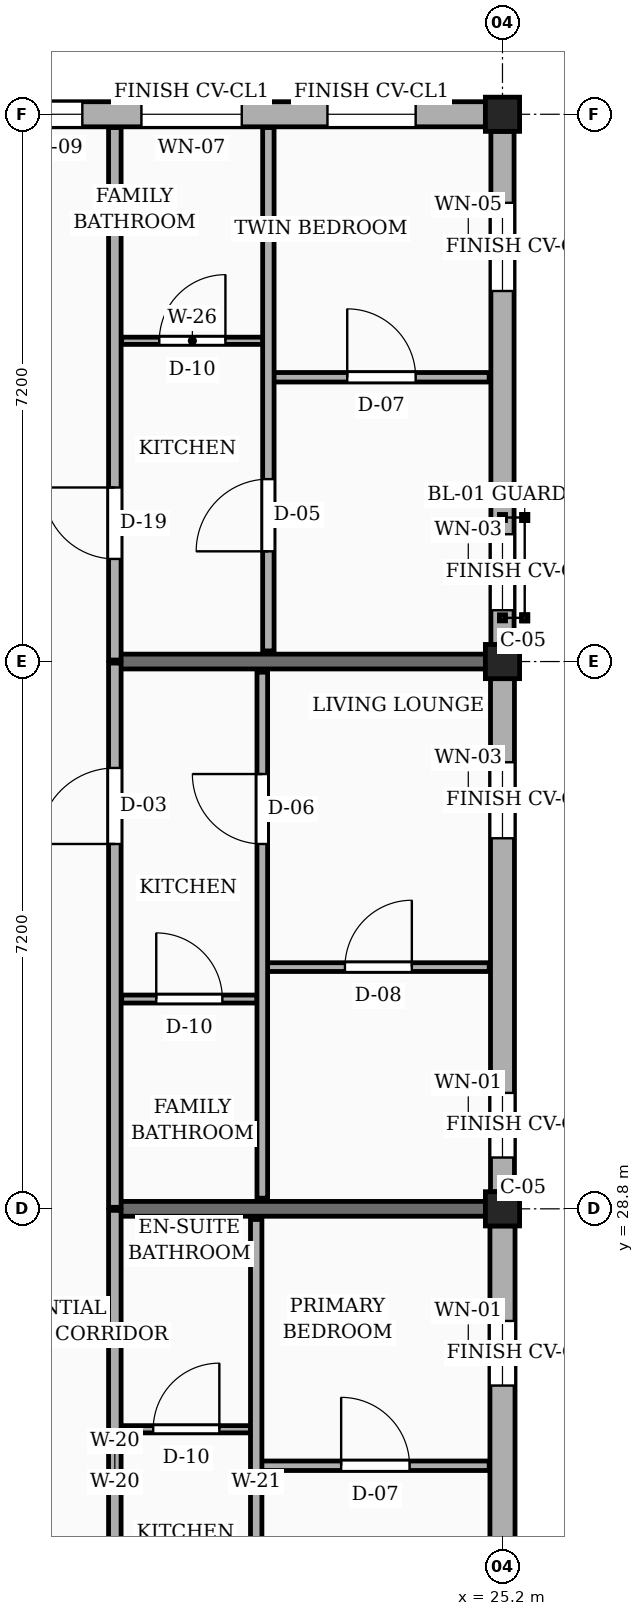
"""IFC4 building model, lengths in metres.
Left out: names, types, materials, properties, quantities, classifications, styles, units other than length and angle.
Written with IfcOpenShell. Run it as: python <this file> out.ifc"""

import sys

from ifc_helpers import new_model, si_unit, direction, frame, frame_2d, origin, origin_2d, place, context, subcontext, project, spatial, rectangle, extrude, element, fill, save


model = new_model("IFC4")
c1 = context("Model", 3, precision=1e-05, world=origin(), true_north=direction((0.0, 1.0)))
c2 = subcontext(c1, "Body", "Model", "MODEL_VIEW")
j1 = project(units=[si_unit("LENGTHUNIT", "METRE"), si_unit("PLANEANGLEUNIT", "RADIAN")], contexts=[c1])
p1 = place(None, origin())
s1 = spatial("IfcSite", under=j1, at=p1, CompositionType="ELEMENT")
p2 = place(p1, origin())
s2 = spatial("IfcBuilding", under=s1, at=p2, CompositionType="ELEMENT")
p3 = place(p2, frame((0.0, 0.0, 39.15)))
s3 = spatial("IfcBuildingStorey", under=s2, at=p3, CompositionType="ELEMENT", Elevation=39.15)
for number, where, z_axis, x_axis in (
    (1, (25.2, 28.8, 0.0), (0.0, 0.0, 1.0), (1.0, 0.0, 0.0)),
    (2, (25.2, 36.0, 0.0), (0.0, 0.0, 1.0), (1.0, 0.0, 0.0)),
    (3, (25.2, 43.2, 0.0), (0.0, 0.0, 1.0), (1.0, 0.0, 0.0)),
):
    element("IfcColumn", number, at=place(p3, frame(where, z_axis=z_axis, x_axis=x_axis)), inside=s3, PredefinedType="COLUMN", context=c2, shape_type="SweptSolid", body=[
        extrude(rectangle(XDim=0.45, YDim=0.45, at=origin_2d()), origin(), (0.0, 0.0, 1.0), 3.15),
    ])
for number, where, z_axis, x_axis in (
    (4, (20.1, 28.8, 0.0), (0.0, 0.0, 1.0), (1.0, 0.0, 0.0)),
    (5, (20.1, 36.0, 0.0), (0.0, 0.0, 1.0), (1.0, 0.0, 0.0)),
):
    element("IfcWall", number, at=place(p3, frame(where, z_axis=z_axis, x_axis=x_axis)), inside=s3, PredefinedType="SOLIDWALL", context=c2, shape_type="SweptSolid", body=[
        extrude(rectangle(XDim=4.875, YDim=0.195, at=frame_2d((2.438, 0.0))), origin(), (0.0, 0.0, 1.0), 2.17),
    ])
p4 = place(p3, frame((25.2, 21.825, 0.0), z_axis=(0.0, 0.0, 1.0), x_axis=(0.0, 1.0, 0.0)))
e6 = element("IfcWall", 6, at=p4, inside=s3, PredefinedType="SOLIDWALL", context=c2, shape_type="SweptSolid", body=[
    extrude(rectangle(XDim=6.75, YDim=0.33, at=frame_2d((3.375, 0.0))), origin(), (0.0, 0.0, 1.0), 2.44),
])
p5 = place(p4, frame((0.45, 0.0, 0.78)))
e7 = element("IfcOpeningElement", 7, at=p5, cuts=e6, PredefinedType="OPENING", context=c2, shape_type="SweptSolid", body=[
    extrude(rectangle(XDim=1.35, YDim=1.44, at=frame_2d((0.675, 0.72))), frame((0.0, 0.175, 0.0), z_axis=(0.0, -1.0, 0.0), x_axis=(1.0, 0.0, 0.0)), (0.0, 0.0, 1.0), 0.35),
])
p6 = place(p4, frame((4.65, 0.0, 0.78)))
e8 = element("IfcOpeningElement", 8, at=p6, cuts=e6, PredefinedType="OPENING", context=c2, shape_type="SweptSolid", body=[
    extrude(rectangle(XDim=0.85, YDim=1.15, at=frame_2d((0.425, 0.575))), frame((0.0, 0.175, 0.0), z_axis=(0.0, -1.0, 0.0), x_axis=(1.0, 0.0, 0.0)), (0.0, 0.0, 1.0), 0.35),
])
p7 = place(p3, frame((25.2, 29.025, 0.0), z_axis=(0.0, 0.0, 1.0), x_axis=(0.0, 1.0, 0.0)))
e9 = element("IfcWall", 9, at=p7, inside=s3, PredefinedType="SOLIDWALL", context=c2, shape_type="SweptSolid", body=[
    extrude(rectangle(XDim=6.75, YDim=0.315, at=frame_2d((3.375, 0.0))), origin(), (0.0, 0.0, 1.0), 2.44),
])
p8 = place(p7, frame((0.45, 0.0, 0.78)))
e10 = element("IfcOpeningElement", 10, at=p8, cuts=e9, PredefinedType="OPENING", context=c2, shape_type="SweptSolid", body=[
    extrude(rectangle(XDim=0.85, YDim=1.15, at=frame_2d((0.425, 0.575))), frame((0.0, 0.167, 0.0), z_axis=(0.0, -1.0, 0.0), x_axis=(1.0, 0.0, 0.0)), (0.0, 0.0, 1.0), 0.335),
])
p9 = place(p7, frame((4.65, 0.0, 0.78)))
e11 = element("IfcOpeningElement", 11, at=p9, cuts=e9, PredefinedType="OPENING", context=c2, shape_type="SweptSolid", body=[
    extrude(rectangle(XDim=1.0, YDim=1.15, at=frame_2d((0.5, 0.575))), frame((0.0, 0.167, 0.0), z_axis=(0.0, -1.0, 0.0), x_axis=(1.0, 0.0, 0.0)), (0.0, 0.0, 1.0), 0.335),
])
p10 = place(p3, frame((25.2, 36.225, 0.0), z_axis=(0.0, 0.0, 1.0), x_axis=(0.0, 1.0, 0.0)))
e12 = element("IfcWall", 12, at=p10, inside=s3, PredefinedType="SOLIDWALL", context=c2, shape_type="SweptSolid", body=[
    extrude(rectangle(XDim=6.75, YDim=0.305, at=frame_2d((3.375, 0.0))), origin(), (0.0, 0.0, 1.0), 2.44),
])
p11 = place(p10, frame((0.45, 0.0, 0.78)))
e13 = element("IfcOpeningElement", 13, at=p11, cuts=e12, PredefinedType="OPENING", context=c2, shape_type="SweptSolid", body=[
    extrude(rectangle(XDim=1.0, YDim=1.15, at=frame_2d((0.5, 0.575))), frame((0.0, 0.163, 0.0), z_axis=(0.0, -1.0, 0.0), x_axis=(1.0, 0.0, 0.0)), (0.0, 0.0, 1.0), 0.325),
])
p12 = place(p10, frame((4.65, 0.0, 0.78)))
e14 = element("IfcOpeningElement", 14, at=p12, cuts=e12, PredefinedType="OPENING", context=c2, shape_type="SweptSolid", body=[
    extrude(rectangle(XDim=1.16, YDim=1.15, at=frame_2d((0.58, 0.575))), frame((0.0, 0.163, 0.0), z_axis=(0.0, -1.0, 0.0), x_axis=(1.0, 0.0, 0.0)), (0.0, 0.0, 1.0), 0.325),
])
p13 = place(p3, frame((24.975, 43.2, 0.0), z_axis=(0.0, 0.0, 1.0), x_axis=(-1.0, 0.0, 0.0)))
e15 = element("IfcWall", 15, at=p13, inside=s3, PredefinedType="SOLIDWALL", context=c2, shape_type="SweptSolid", body=[
    extrude(rectangle(XDim=6.75, YDim=0.33, at=frame_2d((3.375, 0.0))), origin(), (0.0, 0.0, 1.0), 2.44),
])
p14 = place(p13, frame((0.917, 0.0, 0.78)))
e16 = element("IfcOpeningElement", 16, at=p14, cuts=e15, PredefinedType="OPENING", context=c2, shape_type="SweptSolid", body=[
    extrude(rectangle(XDim=1.16, YDim=1.15, at=frame_2d((0.58, 0.575))), frame((0.0, 0.175, 0.0), z_axis=(0.0, -1.0, 0.0), x_axis=(1.0, 0.0, 0.0)), (0.0, 0.0, 1.0), 0.35),
])
p15 = place(p13, frame((3.205, 0.0, 0.78)))
e17 = element("IfcOpeningElement", 17, at=p15, cuts=e15, PredefinedType="OPENING", context=c2, shape_type="SweptSolid", body=[
    extrude(rectangle(XDim=1.32, YDim=1.15, at=frame_2d((0.66, 0.575))), frame((0.0, 0.175, 0.0), z_axis=(0.0, -1.0, 0.0), x_axis=(1.0, 0.0, 0.0)), (0.0, 0.0, 1.0), 0.35),
])
p16 = place(p13, frame((5.302, 0.0, 0.78)))
e18 = element("IfcOpeningElement", 18, at=p16, cuts=e15, PredefinedType="OPENING", context=c2, shape_type="SweptSolid", body=[
    extrude(rectangle(XDim=0.88, YDim=1.26, at=frame_2d((0.44, 0.63))), frame((0.0, 0.175, 0.0), z_axis=(0.0, -1.0, 0.0), x_axis=(1.0, 0.0, 0.0)), (0.0, 0.0, 1.0), 0.35),
])
p17 = place(p3, frame((20.1, 21.62, 0.0), z_axis=(0.0, 0.0, 1.0), x_axis=(0.0, 1.0, 0.0)))
e19 = element("IfcWall", 19, at=p17, inside=s3, PredefinedType="PARTITIONING", context=c2, shape_type="SweptSolid", body=[
    extrude(rectangle(XDim=7.16, YDim=0.165, at=frame_2d((3.58, 0.0))), origin(), (0.0, 0.0, 1.0), 2.305),
])
p18 = place(p17, frame((1.33, 0.0, 0.0)))
e20 = element("IfcOpeningElement", 20, at=p18, cuts=e19, PredefinedType="OPENING", context=c2, shape_type="SweptSolid", body=[
    extrude(rectangle(XDim=1.14, YDim=2.18, at=frame_2d((0.57, 1.09))), frame((0.0, 0.093, 0.0), z_axis=(0.0, -1.0, 0.0), x_axis=(1.0, 0.0, 0.0)), (0.0, 0.0, 1.0), 0.185),
])
p19 = place(p3, frame((20.1, 28.82, 0.0), z_axis=(0.0, 0.0, 1.0), x_axis=(0.0, 1.0, 0.0)))
e21 = element("IfcWall", 21, at=p19, inside=s3, PredefinedType="PARTITIONING", context=c2, shape_type="SweptSolid", body=[
    extrude(rectangle(XDim=7.16, YDim=0.165, at=frame_2d((3.58, 0.0))), origin(), (0.0, 0.0, 1.0), 2.305),
])
p20 = place(p19, frame((4.78, 0.0, 0.0)))
e22 = element("IfcOpeningElement", 22, at=p20, cuts=e21, PredefinedType="OPENING", context=c2, shape_type="SweptSolid", body=[
    extrude(rectangle(XDim=1.0, YDim=2.15, at=frame_2d((0.5, 1.075))), frame((0.0, 0.093, 0.0), z_axis=(0.0, -1.0, 0.0), x_axis=(1.0, 0.0, 0.0)), (0.0, 0.0, 1.0), 0.185),
])
p21 = place(p3, frame((20.1, 36.02, 0.0), z_axis=(0.0, 0.0, 1.0), x_axis=(0.0, 1.0, 0.0)))
e23 = element("IfcWall", 23, at=p21, inside=s3, PredefinedType="PARTITIONING", context=c2, shape_type="SweptSolid", body=[
    extrude(rectangle(XDim=7.005, YDim=0.165, at=frame_2d((3.502, 0.0))), origin(), (0.0, 0.0, 1.0), 2.305),
])
p22 = place(p21, frame((1.33, 0.0, 0.0)))
e24 = element("IfcOpeningElement", 24, at=p22, cuts=e23, PredefinedType="OPENING", context=c2, shape_type="SweptSolid", body=[
    extrude(rectangle(XDim=0.94, YDim=2.12, at=frame_2d((0.47, 1.06))), frame((0.0, 0.093, 0.0), z_axis=(0.0, -1.0, 0.0), x_axis=(1.0, 0.0, 0.0)), (0.0, 0.0, 1.0), 0.185),
])
p23 = place(p3, frame((22.03, 25.42, 0.0), z_axis=(0.0, 0.0, 1.0), x_axis=(1.0, 0.0, 0.0)))
e25 = element("IfcWall", 25, at=p23, inside=s3, PredefinedType="PARTITIONING", context=c2, shape_type="SweptSolid", body=[
    extrude(rectangle(XDim=2.995, YDim=0.125, at=frame_2d((1.498, 0.0))), origin(), (0.0, 0.0, 1.0), 2.305),
])
p24 = place(p23, frame((1.048, 0.0, 0.0)))
e26 = element("IfcOpeningElement", 26, at=p24, cuts=e25, PredefinedType="OPENING", context=c2, shape_type="SweptSolid", body=[
    extrude(rectangle(XDim=0.9, YDim=2.1, at=frame_2d((0.45, 1.05))), frame((0.0, 0.073, 0.0), z_axis=(0.0, -1.0, 0.0), x_axis=(1.0, 0.0, 0.0)), (0.0, 0.0, 1.0), 0.145),
])
p25 = place(p3, frame((20.19, 25.9, 0.0), z_axis=(0.0, 0.0, 1.0), x_axis=(1.0, 0.0, 0.0)))
e27 = element("IfcWall", 27, at=p25, inside=s3, PredefinedType="PARTITIONING", context=c2, shape_type="SweptSolid", body=[
    extrude(rectangle(XDim=1.7, YDim=0.095, at=frame_2d((0.85, 0.0))), origin(), (0.0, 0.0, 1.0), 2.305),
])
p26 = place(p25, frame((0.415, 0.0, 0.0)))
e28 = element("IfcOpeningElement", 28, at=p26, cuts=e27, PredefinedType="OPENING", context=c2, shape_type="SweptSolid", body=[
    extrude(rectangle(XDim=0.87, YDim=2.05, at=frame_2d((0.435, 1.025))), frame((0.0, 0.058, 0.0), z_axis=(0.0, -1.0, 0.0), x_axis=(1.0, 0.0, 0.0)), (0.0, 0.0, 1.0), 0.115),
])
p27 = place(p3, frame((21.96, 21.74, 0.0), z_axis=(0.0, 0.0, 1.0), x_axis=(0.0, 1.0, 0.0)))
e29 = element("IfcWall", 29, at=p27, inside=s3, PredefinedType="PARTITIONING", context=c2, shape_type="SweptSolid", body=[
    extrude(rectangle(XDim=6.92, YDim=0.15, at=frame_2d((3.46, 0.0))), origin(), (0.0, 0.0, 1.0), 2.305),
])
p28 = place(p27, frame((1.31, 0.0, 0.0)))
e30 = element("IfcOpeningElement", 30, at=p28, cuts=e29, PredefinedType="OPENING", context=c2, shape_type="SweptSolid", body=[
    extrude(rectangle(XDim=0.95, YDim=2.1, at=frame_2d((0.475, 1.05))), frame((0.0, 0.085, 0.0), z_axis=(0.0, -1.0, 0.0), x_axis=(1.0, 0.0, 0.0)), (0.0, 0.0, 1.0), 0.17),
])
p29 = place(p3, frame((22.11, 31.98, 0.0), z_axis=(0.0, 0.0, 1.0), x_axis=(1.0, 0.0, 0.0)))
e31 = element("IfcWall", 31, at=p29, inside=s3, PredefinedType="PARTITIONING", context=c2, shape_type="SweptSolid", body=[
    extrude(rectangle(XDim=2.915, YDim=0.115, at=frame_2d((1.458, 0.0))), origin(), (0.0, 0.0, 1.0), 2.305),
])
p30 = place(p29, frame((1.018, 0.0, 0.0)))
e32 = element("IfcOpeningElement", 32, at=p30, cuts=e31, PredefinedType="OPENING", context=c2, shape_type="SweptSolid", body=[
    extrude(rectangle(XDim=0.88, YDim=2.08, at=frame_2d((0.44, 1.04))), frame((0.0, 0.067, 0.0), z_axis=(0.0, -1.0, 0.0), x_axis=(1.0, 0.0, 0.0)), (0.0, 0.0, 1.0), 0.135),
])
p31 = place(p3, frame((20.19, 31.56, 0.0), z_axis=(0.0, 0.0, 1.0), x_axis=(1.0, 0.0, 0.0)))
e33 = element("IfcWall", 33, at=p31, inside=s3, PredefinedType="PARTITIONING", context=c2, shape_type="SweptSolid", body=[
    extrude(rectangle(XDim=1.78, YDim=0.105, at=frame_2d((0.89, 0.0))), origin(), (0.0, 0.0, 1.0), 2.305),
])
p32 = place(p31, frame((0.455, 0.0, 0.0)))
e34 = element("IfcOpeningElement", 34, at=p32, cuts=e33, PredefinedType="OPENING", context=c2, shape_type="SweptSolid", body=[
    extrude(rectangle(XDim=0.87, YDim=2.05, at=frame_2d((0.435, 1.025))), frame((0.0, 0.062, 0.0), z_axis=(0.0, -1.0, 0.0), x_axis=(1.0, 0.0, 0.0)), (0.0, 0.0, 1.0), 0.125),
])
p33 = place(p3, frame((22.04, 28.94, 0.0), z_axis=(0.0, 0.0, 1.0), x_axis=(0.0, 1.0, 0.0)))
e35 = element("IfcWall", 35, at=p33, inside=s3, PredefinedType="PARTITIONING", context=c2, shape_type="SweptSolid", body=[
    extrude(rectangle(XDim=6.92, YDim=0.14, at=frame_2d((3.46, 0.0))), origin(), (0.0, 0.0, 1.0), 2.305),
])
p34 = place(p33, frame((4.66, 0.0, 0.0)))
e36 = element("IfcOpeningElement", 36, at=p34, cuts=e35, PredefinedType="OPENING", context=c2, shape_type="SweptSolid", body=[
    extrude(rectangle(XDim=0.92, YDim=2.1, at=frame_2d((0.46, 1.05))), frame((0.0, 0.08, 0.0), z_axis=(0.0, -1.0, 0.0), x_axis=(1.0, 0.0, 0.0)), (0.0, 0.0, 1.0), 0.16),
])
p35 = place(p3, frame((22.19, 39.74, 0.0), z_axis=(0.0, 0.0, 1.0), x_axis=(1.0, 0.0, 0.0)))
e37 = element("IfcWall", 37, at=p35, inside=s3, PredefinedType="PARTITIONING", context=c2, shape_type="SweptSolid", body=[
    extrude(rectangle(XDim=2.835, YDim=0.125, at=frame_2d((1.417, 0.0))), origin(), (0.0, 0.0, 1.0), 2.305),
])
p36 = place(p35, frame((0.968, 0.0, 0.0)))
e38 = element("IfcOpeningElement", 38, at=p36, cuts=e37, PredefinedType="OPENING", context=c2, shape_type="SweptSolid", body=[
    extrude(rectangle(XDim=0.9, YDim=2.1, at=frame_2d((0.45, 1.05))), frame((0.0, 0.073, 0.0), z_axis=(0.0, -1.0, 0.0), x_axis=(1.0, 0.0, 0.0)), (0.0, 0.0, 1.0), 0.145),
])
p37 = place(p3, frame((20.19, 40.22, 0.0), z_axis=(0.0, 0.0, 1.0), x_axis=(1.0, 0.0, 0.0)))
e39 = element("IfcWall", 39, at=p37, inside=s3, PredefinedType="PARTITIONING", context=c2, shape_type="SweptSolid", body=[
    extrude(rectangle(XDim=1.86, YDim=0.095, at=frame_2d((0.93, 0.0))), origin(), (0.0, 0.0, 1.0), 2.305),
])
p38 = place(p37, frame((0.495, 0.0, 0.0)))
e40 = element("IfcOpeningElement", 40, at=p38, cuts=e39, PredefinedType="OPENING", context=c2, shape_type="SweptSolid", body=[
    extrude(rectangle(XDim=0.87, YDim=2.05, at=frame_2d((0.435, 1.025))), frame((0.0, 0.058, 0.0), z_axis=(0.0, -1.0, 0.0), x_axis=(1.0, 0.0, 0.0)), (0.0, 0.0, 1.0), 0.115),
])
p39 = place(p3, frame((22.12, 36.14, 0.0), z_axis=(0.0, 0.0, 1.0), x_axis=(0.0, 1.0, 0.0)))
e41 = element("IfcWall", 41, at=p39, inside=s3, PredefinedType="PARTITIONING", context=c2, shape_type="SweptSolid", body=[
    extrude(rectangle(XDim=6.885, YDim=0.15, at=frame_2d((3.442, 0.0))), origin(), (0.0, 0.0, 1.0), 2.305),
])
p40 = place(p39, frame((1.31, 0.0, 0.0)))
e42 = element("IfcOpeningElement", 42, at=p40, cuts=e41, PredefinedType="OPENING", context=c2, shape_type="SweptSolid", body=[
    extrude(rectangle(XDim=0.95, YDim=2.1, at=frame_2d((0.475, 1.05))), frame((0.0, 0.085, 0.0), z_axis=(0.0, -1.0, 0.0), x_axis=(1.0, 0.0, 0.0)), (0.0, 0.0, 1.0), 0.17),
])
p41 = place(p6, origin())
e43 = element("IfcWindow", 43, at=p41, inside=s3, PartitioningType="SINGLE_PANEL", PredefinedType="WINDOW", context=c2, shape_type="SweptSolid", body=[
    extrude(rectangle(XDim=0.85, YDim=1.15, at=frame_2d((0.425, 0.575))), frame((0.0, 0.03, 0.0), z_axis=(0.0, -1.0, 0.0), x_axis=(1.0, 0.0, 0.0)), (0.0, 0.0, 1.0), 0.06),
])
fill(e8, e43)
p42 = place(p8, origin())
e44 = element("IfcWindow", 44, at=p42, inside=s3, PartitioningType="SINGLE_PANEL", PredefinedType="WINDOW", context=c2, shape_type="SweptSolid", body=[
    extrude(rectangle(XDim=0.85, YDim=1.15, at=frame_2d((0.425, 0.575))), frame((0.0, 0.03, 0.0), z_axis=(0.0, -1.0, 0.0), x_axis=(1.0, 0.0, 0.0)), (0.0, 0.0, 1.0), 0.06),
])
fill(e10, e44)
p43 = place(p9, origin())
e45 = element("IfcWindow", 45, at=p43, inside=s3, PartitioningType="SINGLE_PANEL", PredefinedType="WINDOW", context=c2, shape_type="SweptSolid", body=[
    extrude(rectangle(XDim=1.0, YDim=1.15, at=frame_2d((0.5, 0.575))), frame((0.0, 0.03, 0.0), z_axis=(0.0, -1.0, 0.0), x_axis=(1.0, 0.0, 0.0)), (0.0, 0.0, 1.0), 0.06),
])
fill(e11, e45)
p44 = place(p11, origin())
e46 = element("IfcWindow", 46, at=p44, inside=s3, PartitioningType="SINGLE_PANEL", PredefinedType="WINDOW", context=c2, shape_type="SweptSolid", body=[
    extrude(rectangle(XDim=1.0, YDim=1.15, at=frame_2d((0.5, 0.575))), frame((0.0, 0.03, 0.0), z_axis=(0.0, -1.0, 0.0), x_axis=(1.0, 0.0, 0.0)), (0.0, 0.0, 1.0), 0.06),
])
fill(e13, e46)
p45 = place(p12, origin())
e47 = element("IfcWindow", 47, at=p45, inside=s3, PartitioningType="SINGLE_PANEL", PredefinedType="WINDOW", context=c2, shape_type="SweptSolid", body=[
    extrude(rectangle(XDim=1.16, YDim=1.15, at=frame_2d((0.58, 0.575))), frame((0.0, 0.03, 0.0), z_axis=(0.0, -1.0, 0.0), x_axis=(1.0, 0.0, 0.0)), (0.0, 0.0, 1.0), 0.06),
])
fill(e14, e47)
p46 = place(p14, origin())
e48 = element("IfcWindow", 48, at=p46, inside=s3, PartitioningType="SINGLE_PANEL", PredefinedType="WINDOW", context=c2, shape_type="SweptSolid", body=[
    extrude(rectangle(XDim=1.16, YDim=1.15, at=frame_2d((0.58, 0.575))), frame((0.0, 0.03, 0.0), z_axis=(0.0, -1.0, 0.0), x_axis=(1.0, 0.0, 0.0)), (0.0, 0.0, 1.0), 0.06),
])
fill(e16, e48)
p47 = place(p15, origin())
e49 = element("IfcWindow", 49, at=p47, inside=s3, PartitioningType="SINGLE_PANEL", PredefinedType="WINDOW", context=c2, shape_type="SweptSolid", body=[
    extrude(rectangle(XDim=1.32, YDim=1.15, at=frame_2d((0.66, 0.575))), frame((0.0, 0.03, 0.0), z_axis=(0.0, -1.0, 0.0), x_axis=(1.0, 0.0, 0.0)), (0.0, 0.0, 1.0), 0.06),
])
fill(e17, e49)
p48 = place(p16, origin())
e50 = element("IfcWindow", 50, at=p48, inside=s3, PartitioningType="SINGLE_PANEL", PredefinedType="WINDOW", context=c2, shape_type="SweptSolid", body=[
    extrude(rectangle(XDim=0.88, YDim=1.26, at=frame_2d((0.44, 0.63))), frame((0.0, 0.03, 0.0), z_axis=(0.0, -1.0, 0.0), x_axis=(1.0, 0.0, 0.0)), (0.0, 0.0, 1.0), 0.06),
])
fill(e18, e50)
p49 = place(p20, origin())
e51 = element("IfcDoor", 51, at=p49, inside=s3, OperationType="SINGLE_SWING_LEFT", PredefinedType="DOOR", context=c2, shape_type="SweptSolid", body=[
    extrude(rectangle(XDim=1.0, YDim=2.15, at=frame_2d((0.5, 1.075))), frame((0.0, 0.025, 0.0), z_axis=(0.0, -1.0, 0.0), x_axis=(1.0, 0.0, 0.0)), (0.0, 0.0, 1.0), 0.05),
])
fill(e22, e51)
p50 = place(p22, origin())
e52 = element("IfcDoor", 52, at=p50, inside=s3, OperationType="SINGLE_SWING_RIGHT", PredefinedType="DOOR", context=c2, shape_type="SweptSolid", body=[
    extrude(rectangle(XDim=0.94, YDim=2.12, at=frame_2d((0.47, 1.06))), frame((0.0, 0.025, 0.0), z_axis=(0.0, -1.0, 0.0), x_axis=(1.0, 0.0, 0.0)), (0.0, 0.0, 1.0), 0.05),
])
fill(e24, e52)
p51 = place(p24, origin())
e53 = element("IfcDoor", 53, at=p51, inside=s3, OperationType="SINGLE_SWING_LEFT", PredefinedType="DOOR", context=c2, shape_type="SweptSolid", body=[
    extrude(rectangle(XDim=0.9, YDim=2.1, at=frame_2d((0.45, 1.05))), frame((0.0, 0.025, 0.0), z_axis=(0.0, -1.0, 0.0), x_axis=(1.0, 0.0, 0.0)), (0.0, 0.0, 1.0), 0.05),
])
fill(e26, e53)
p52 = place(p26, origin())
e54 = element("IfcDoor", 54, at=p52, inside=s3, OperationType="SINGLE_SWING_RIGHT", PredefinedType="DOOR", context=c2, shape_type="SweptSolid", body=[
    extrude(rectangle(XDim=0.87, YDim=2.05, at=frame_2d((0.435, 1.025))), frame((0.0, 0.025, 0.0), z_axis=(0.0, -1.0, 0.0), x_axis=(1.0, 0.0, 0.0)), (0.0, 0.0, 1.0), 0.05),
])
fill(e28, e54)
p53 = place(p30, origin())
e55 = element("IfcDoor", 55, at=p53, inside=s3, OperationType="SINGLE_SWING_RIGHT", PredefinedType="DOOR", context=c2, shape_type="SweptSolid", body=[
    extrude(rectangle(XDim=0.88, YDim=2.08, at=frame_2d((0.44, 1.04))), frame((0.0, 0.025, 0.0), z_axis=(0.0, -1.0, 0.0), x_axis=(1.0, 0.0, 0.0)), (0.0, 0.0, 1.0), 0.05),
])
fill(e32, e55)
p54 = place(p32, origin())
e56 = element("IfcDoor", 56, at=p54, inside=s3, OperationType="SINGLE_SWING_LEFT", PredefinedType="DOOR", context=c2, shape_type="SweptSolid", body=[
    extrude(rectangle(XDim=0.87, YDim=2.05, at=frame_2d((0.435, 1.025))), frame((0.0, 0.025, 0.0), z_axis=(0.0, -1.0, 0.0), x_axis=(1.0, 0.0, 0.0)), (0.0, 0.0, 1.0), 0.05),
])
fill(e34, e56)
p55 = place(p34, origin())
e57 = element("IfcDoor", 57, at=p55, inside=s3, OperationType="SINGLE_SWING_RIGHT", PredefinedType="DOOR", context=c2, shape_type="SweptSolid", body=[
    extrude(rectangle(XDim=0.92, YDim=2.1, at=frame_2d((0.46, 1.05))), frame((0.0, 0.025, 0.0), z_axis=(0.0, -1.0, 0.0), x_axis=(1.0, 0.0, 0.0)), (0.0, 0.0, 1.0), 0.05),
])
fill(e36, e57)
p56 = place(p36, origin())
e58 = element("IfcDoor", 58, at=p56, inside=s3, OperationType="SINGLE_SWING_LEFT", PredefinedType="DOOR", context=c2, shape_type="SweptSolid", body=[
    extrude(rectangle(XDim=0.9, YDim=2.1, at=frame_2d((0.45, 1.05))), frame((0.0, 0.025, 0.0), z_axis=(0.0, -1.0, 0.0), x_axis=(1.0, 0.0, 0.0)), (0.0, 0.0, 1.0), 0.05),
])
fill(e38, e58)
p57 = place(p38, origin())
e59 = element("IfcDoor", 59, at=p57, inside=s3, OperationType="SINGLE_SWING_RIGHT", PredefinedType="DOOR", context=c2, shape_type="SweptSolid", body=[
    extrude(rectangle(XDim=0.87, YDim=2.05, at=frame_2d((0.435, 1.025))), frame((0.0, 0.025, 0.0), z_axis=(0.0, -1.0, 0.0), x_axis=(1.0, 0.0, 0.0)), (0.0, 0.0, 1.0), 0.05),
])
fill(e40, e59)
p58 = place(p40, origin())
e60 = element("IfcDoor", 60, at=p58, inside=s3, OperationType="SINGLE_SWING_LEFT", PredefinedType="DOOR", context=c2, shape_type="SweptSolid", body=[
    extrude(rectangle(XDim=0.95, YDim=2.1, at=frame_2d((0.475, 1.05))), frame((0.0, 0.025, 0.0), z_axis=(0.0, -1.0, 0.0), x_axis=(1.0, 0.0, 0.0)), (0.0, 0.0, 1.0), 0.05),
])
fill(e42, e60)
save(model, sys.argv[1])
